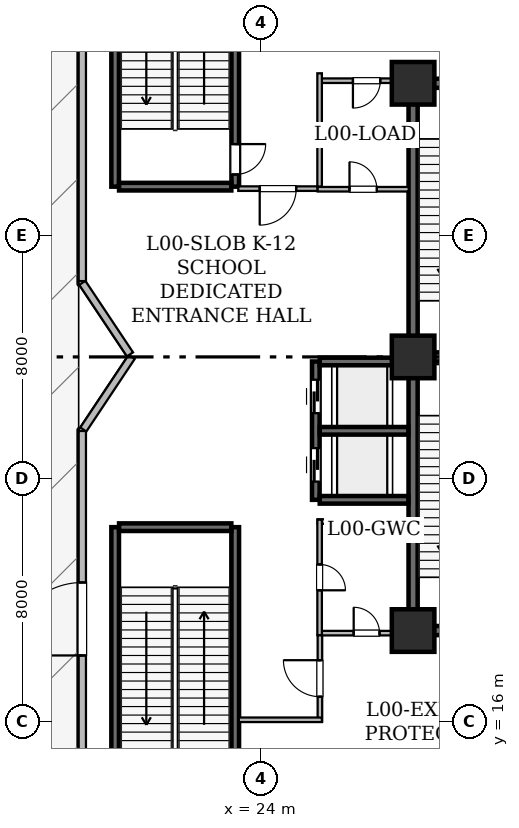
"""IFC4 building model, lengths in metres.
Left out: names, types, materials, properties, quantities, classifications, styles, units other than length and angle.
Written with IfcOpenShell. Run it as: python <this file> out.ifc"""

import sys

from ifc_helpers import new_model, si_unit, direction, frame, frame_2d, origin, origin_2d, place, context, subcontext, project, spatial, rectangle, hollow_rectangle, extrude, element, fill, save


model = new_model("IFC4")
c1 = context("Model", 3, precision=1e-05, world=origin(), true_north=direction((0.0, 1.0)))
c2 = subcontext(c1, "Body", "Model", "MODEL_VIEW")
j1 = project(units=[si_unit("LENGTHUNIT", "METRE"), si_unit("PLANEANGLEUNIT", "RADIAN")], contexts=[c1])
p1 = place(None, origin())
s1 = spatial("IfcSite", under=j1, at=p1, CompositionType="ELEMENT")
p2 = place(p1, origin())
s2 = spatial("IfcBuilding", under=s1, at=p2, CompositionType="ELEMENT")
p3 = place(p2, origin())
s3 = spatial("IfcBuildingStorey", under=s2, at=p3, CompositionType="ELEMENT", Elevation=0.0)
for number, where, z_axis, x_axis in (
    (1, (29.0, 19.0, 0.0), (0.0, 0.0, 1.0), (1.0, 0.0, 0.0)),
    (2, (29.0, 28.0, 0.0), (0.0, 0.0, 1.0), (1.0, 0.0, 0.0)),
    (3, (29.0, 37.0, 0.0), (0.0, 0.0, 1.0), (1.0, 0.0, 0.0)),
):
    element("IfcColumn", number, at=place(p3, frame(where, z_axis=z_axis, x_axis=x_axis)), inside=s3, PredefinedType="COLUMN", context=c2, shape_type="SweptSolid", body=[
        extrude(hollow_rectangle(XDim=1.4, YDim=1.4, WallThickness=0.07, at=origin_2d()), origin(), (0.0, 0.0, 1.0), 7.2),
    ])
p4 = place(p3, frame((18.12, 13.197, 0.0), z_axis=(0.0, 0.0, 1.0), x_axis=(0.0, 1.0, 0.0)))
e4 = element("IfcWall", 4, at=p4, inside=s3, PredefinedType="STANDARD", context=c2, shape_type="SweptSolid", body=[
    extrude(rectangle(XDim=12.367, YDim=0.24, at=frame_2d((6.184, 0.0))), origin(), (0.0, 0.0, 1.0), 6.78),
])
p5 = place(p4, frame((4.984, 0.0, 0.0)))
e5 = element("IfcOpeningElement", 5, at=p5, cuts=e4, PredefinedType="OPENING", context=c2, shape_type="SweptSolid", body=[
    extrude(rectangle(XDim=2.4, YDim=2.4, at=frame_2d((1.2, 1.2))), frame((0.0, 0.13, 0.0), z_axis=(0.0, -1.0, 0.0), x_axis=(1.0, 0.0, 0.0)), (0.0, 0.0, 1.0), 0.26),
])
p6 = place(p3, frame((18.152, 25.612, 0.0), z_axis=(0.0, 0.0, 1.0), x_axis=(0.55466093221, 0.83207646901, 0.0)))
e6 = element("IfcWall", 6, at=p6, inside=s3, PredefinedType="STANDARD", context=c2, shape_type="SweptSolid", body=[
    extrude(rectangle(XDim=2.87, YDim=0.24, at=frame_2d((1.435, 0.0))), origin(), (0.0, 0.0, 1.0), 6.78),
])
p7 = place(p3, frame((19.688, 28.084, 0.0), z_axis=(0.0, 0.0, 1.0), x_axis=(-0.554660333073, 0.832076868394, 0.0)))
e7 = element("IfcWall", 7, at=p7, inside=s3, PredefinedType="STANDARD", context=c2, shape_type="SweptSolid", body=[
    extrude(rectangle(XDim=2.827, YDim=0.24, at=frame_2d((1.413, 0.0))), origin(), (0.0, 0.0, 1.0), 6.78),
])
p8 = place(p3, frame((18.12, 30.494, 0.0), z_axis=(0.0, 0.0, 1.0), x_axis=(0.0, 1.0, 0.0)))
e8 = element("IfcWall", 8, at=p8, inside=s3, PredefinedType="STANDARD", context=c2, shape_type="SweptSolid", body=[
    extrude(rectangle(XDim=12.309, YDim=0.24, at=frame_2d((6.155, 0.0))), origin(), (0.0, 0.0, 1.0), 6.78),
])
for number, where, z_axis, x_axis in (
    (9, (29.0, 19.0, 0.0), (0.0, 0.0, 1.0), (0.0, 1.0, 0.0)),
    (10, (29.0, 28.0, 0.0), (0.0, 0.0, 1.0), (0.0, 1.0, 0.0)),
):
    element("IfcWall", number, at=place(p3, frame(where, z_axis=z_axis, x_axis=x_axis)), inside=s3, PredefinedType="SHEAR", context=c2, shape_type="SweptSolid", body=[
        extrude(rectangle(XDim=9.0, YDim=0.3, at=frame_2d((4.5, 0.0))), origin(), (0.0, 0.0, 1.0), 6.78),
    ])
p9 = place(p3, frame((39.4, 19.0, 0.0), z_axis=(0.0, 0.0, 1.0), x_axis=(-1.0, 0.0, 0.0)))
e11 = element("IfcWall", 11, at=p9, inside=s3, PredefinedType="SHEAR", context=c2, shape_type="SweptSolid", body=[
    extrude(rectangle(XDim=10.4, YDim=0.3, at=frame_2d((5.2, 0.0))), origin(), (0.0, 0.0, 1.0), 6.78),
])
p10 = place(p9, frame((4.3, 0.0, 0.0)))
e12 = element("IfcOpeningElement", 12, at=p10, cuts=e11, PredefinedType="OPENING", context=c2, shape_type="SweptSolid", body=[
    extrude(rectangle(XDim=1.2, YDim=2.15, at=frame_2d((0.6, 1.075))), frame((0.0, 0.16, 0.0), z_axis=(0.0, -1.0, 0.0), x_axis=(1.0, 0.0, 0.0)), (0.0, 0.0, 1.0), 0.32),
])
p11 = place(p3, frame((29.0, 37.0, 0.0), z_axis=(0.0, 0.0, 1.0), x_axis=(1.0, 0.0, 0.0)))
e13 = element("IfcWall", 13, at=p11, inside=s3, PredefinedType="SHEAR", context=c2, shape_type="SweptSolid", body=[
    extrude(rectangle(XDim=10.4, YDim=0.3, at=frame_2d((5.2, 0.0))), origin(), (0.0, 0.0, 1.0), 6.78),
])
p12 = place(p11, frame((5.14, 0.0, 0.0)))
e14 = element("IfcOpeningElement", 14, at=p12, cuts=e13, PredefinedType="OPENING", context=c2, shape_type="SweptSolid", body=[
    extrude(rectangle(XDim=1.15, YDim=2.2, at=frame_2d((0.575, 1.1))), frame((0.0, 0.16, 0.0), z_axis=(0.0, -1.0, 0.0), x_axis=(1.0, 0.0, 0.0)), (0.0, 0.0, 1.0), 0.32),
])
p13 = place(p3, frame((29.0, 28.0, 0.0), z_axis=(0.0, 0.0, 1.0), x_axis=(1.0, 0.0, 0.0)))
e15 = element("IfcWall", 15, at=p13, inside=s3, PredefinedType="SHEAR", context=c2, shape_type="SweptSolid", body=[
    extrude(rectangle(XDim=3.65, YDim=0.3, at=frame_2d((1.825, 0.0))), origin(), (0.0, 0.0, 1.0), 6.78),
])
p14 = place(p3, frame((19.2, 13.2, 0.0), z_axis=(0.0, 0.0, 1.0), x_axis=(0.0, 1.0, 0.0)))
e16 = element("IfcWall", 16, at=p14, inside=s3, PredefinedType="SHEAR", context=c2, shape_type="SweptSolid", body=[
    extrude(rectangle(XDim=9.2, YDim=0.25, at=frame_2d((4.6, 0.0))), origin(), (0.0, 0.0, 1.0), 6.78),
])
p15 = place(p3, frame((23.15, 22.4, 0.0), z_axis=(0.0, 0.0, 1.0), x_axis=(0.0, -1.0, 0.0)))
e17 = element("IfcWall", 17, at=p15, inside=s3, PredefinedType="SHEAR", context=c2, shape_type="SweptSolid", body=[
    extrude(rectangle(XDim=9.2, YDim=0.25, at=frame_2d((4.6, 0.0))), origin(), (0.0, 0.0, 1.0), 6.78),
])
p16 = place(p15, frame((7.4, 0.0, 0.0)))
e18 = element("IfcOpeningElement", 18, at=p16, cuts=e17, PredefinedType="OPENING", context=c2, shape_type="SweptSolid", body=[
    extrude(rectangle(XDim=1.0, YDim=2.15, at=frame_2d((0.5, 1.075))), frame((0.0, 0.135, 0.0), z_axis=(0.0, -1.0, 0.0), x_axis=(1.0, 0.0, 0.0)), (0.0, 0.0, 1.0), 0.27),
])
p17 = place(p3, frame((19.329, 22.4, 0.0), z_axis=(0.0, 0.0, 1.0), x_axis=(1.0, 0.0, 0.0)))
e19 = element("IfcWall", 19, at=p17, inside=s3, PredefinedType="SHEAR", context=c2, shape_type="SweptSolid", body=[
    extrude(rectangle(XDim=3.692, YDim=0.25, at=frame_2d((1.846, 0.0))), origin(), (0.0, 0.0, 1.0), 6.78),
])
p18 = place(p3, frame((19.2, 33.6, 0.0), z_axis=(0.0, 0.0, 1.0), x_axis=(0.0, 1.0, 0.0)))
e20 = element("IfcWall", 20, at=p18, inside=s3, PredefinedType="SHEAR", context=c2, shape_type="SweptSolid", body=[
    extrude(rectangle(XDim=9.2, YDim=0.25, at=frame_2d((4.6, 0.0))), origin(), (0.0, 0.0, 1.0), 6.78),
])
p19 = place(p3, frame((23.15, 42.8, 0.0), z_axis=(0.0, 0.0, 1.0), x_axis=(0.0, -1.0, 0.0)))
e21 = element("IfcWall", 21, at=p19, inside=s3, PredefinedType="SHEAR", context=c2, shape_type="SweptSolid", body=[
    extrude(rectangle(XDim=9.2, YDim=0.25, at=frame_2d((4.6, 0.0))), origin(), (0.0, 0.0, 1.0), 6.78),
])
p20 = place(p19, frame((7.8, 0.0, 0.0)))
e22 = element("IfcOpeningElement", 22, at=p20, cuts=e21, PredefinedType="OPENING", context=c2, shape_type="SweptSolid", body=[
    extrude(rectangle(XDim=1.0, YDim=2.15, at=frame_2d((0.5, 1.075))), frame((0.0, 0.135, 0.0), z_axis=(0.0, -1.0, 0.0), x_axis=(1.0, 0.0, 0.0)), (0.0, 0.0, 1.0), 0.27),
])
p21 = place(p3, frame((19.329, 33.6, 0.0), z_axis=(0.0, 0.0, 1.0), x_axis=(1.0, 0.0, 0.0)))
e23 = element("IfcWall", 23, at=p21, inside=s3, PredefinedType="SHEAR", context=c2, shape_type="SweptSolid", body=[
    extrude(rectangle(XDim=3.692, YDim=0.25, at=frame_2d((1.846, 0.0))), origin(), (0.0, 0.0, 1.0), 6.78),
])
p22 = place(p3, frame((25.8, 23.3, 0.0), z_axis=(0.0, 0.0, 1.0), x_axis=(0.0, 1.0, 0.0)))
e24 = element("IfcWall", 24, at=p22, inside=s3, PredefinedType="SHEAR", context=c2, shape_type="SweptSolid", body=[
    extrude(rectangle(XDim=4.55, YDim=0.25, at=frame_2d((2.275, 0.0))), origin(), (0.0, 0.0, 1.0), 6.78),
])
p23 = place(p22, frame((0.6, 0.0, 0.0)))
e25 = element("IfcOpeningElement", 25, at=p23, cuts=e24, PredefinedType="OPENING", context=c2, shape_type="SweptSolid", body=[
    extrude(rectangle(XDim=1.1, YDim=2.15, at=frame_2d((0.55, 1.075))), frame((0.0, 0.135, 0.0), z_axis=(0.0, -1.0, 0.0), x_axis=(1.0, 0.0, 0.0)), (0.0, 0.0, 1.0), 0.27),
])
p24 = place(p22, frame((2.85, 0.0, 0.0)))
e26 = element("IfcOpeningElement", 26, at=p24, cuts=e24, PredefinedType="OPENING", context=c2, shape_type="SweptSolid", body=[
    extrude(rectangle(XDim=1.1, YDim=2.15, at=frame_2d((0.55, 1.075))), frame((0.0, 0.135, 0.0), z_axis=(0.0, -1.0, 0.0), x_axis=(1.0, 0.0, 0.0)), (0.0, 0.0, 1.0), 0.27),
])
for number, where, z_axis, x_axis in (
    (27, (25.929, 23.3, 0.0), (0.0, 0.0, 1.0), (1.0, 0.0, 0.0)),
    (28, (25.929, 27.85, 0.0), (0.0, 0.0, 1.0), (1.0, 0.0, 0.0)),
    (29, (25.929, 25.57, 0.0), (0.0, 0.0, 1.0), (1.0, 0.0, 0.0)),
):
    element("IfcWall", number, at=place(p3, frame(where, z_axis=z_axis, x_axis=x_axis)), inside=s3, PredefinedType="SHEAR", context=c2, shape_type="SweptSolid", body=[
        extrude(rectangle(XDim=2.917, YDim=0.25, at=frame_2d((1.458, 0.0))), origin(), (0.0, 0.0, 1.0), 6.78),
    ])
p25 = place(p3, frame((25.935, 16.0, 0.0), z_axis=(0.0, 0.0, 1.0), x_axis=(0.0, 1.0, 0.0)))
e30 = element("IfcWall", 30, at=p25, inside=s3, PredefinedType="STANDARD", context=c2, shape_type="SweptSolid", body=[
    extrude(rectangle(XDim=2.85, YDim=0.15, at=frame_2d((1.425, 0.0))), origin(), (0.0, 0.0, 1.0), 6.78),
])
p26 = place(p25, frame((0.825, 0.0, 0.0)))
e31 = element("IfcOpeningElement", 31, at=p26, cuts=e30, PredefinedType="OPENING", context=c2, shape_type="SweptSolid", body=[
    extrude(rectangle(XDim=1.2, YDim=2.15, at=frame_2d((0.6, 1.075))), frame((0.0, 0.085, 0.0), z_axis=(0.0, -1.0, 0.0), x_axis=(1.0, 0.0, 0.0)), (0.0, 0.0, 1.0), 0.17),
])
p27 = place(p3, frame((23.267, 16.065, 0.0), z_axis=(0.0, 0.0, 1.0), x_axis=(1.0, 0.0, 0.0)))
e32 = element("IfcWall", 32, at=p27, inside=s3, PredefinedType="STANDARD", context=c2, shape_type="SweptSolid", body=[
    extrude(rectangle(XDim=2.733, YDim=0.15, at=frame_2d((1.366, 0.0))), origin(), (0.0, 0.0, 1.0), 6.78),
])
p28 = place(p3, frame((26.0, 18.915, 0.0), z_axis=(0.0, 0.0, 1.0), x_axis=(1.0, 0.0, 0.0)))
e33 = element("IfcWall", 33, at=p28, inside=s3, PredefinedType="STANDARD", context=c2, shape_type="SweptSolid", body=[
    extrude(rectangle(XDim=2.943, YDim=0.15, at=frame_2d((1.472, 0.0))), origin(), (0.0, 0.0, 1.0), 6.237),
])
p29 = place(p28, frame((1.046, 0.0, 0.0)))
e34 = element("IfcOpeningElement", 34, at=p29, cuts=e33, PredefinedType="OPENING", context=c2, shape_type="SweptSolid", body=[
    extrude(rectangle(XDim=0.85, YDim=2.1, at=frame_2d((0.425, 1.05))), frame((0.0, 0.085, 0.0), z_axis=(0.0, -1.0, 0.0), x_axis=(1.0, 0.0, 0.0)), (0.0, 0.0, 1.0), 0.17),
])
p30 = place(p3, frame((25.86, 33.535, 0.0), z_axis=(0.0, 0.0, 1.0), x_axis=(-1.0, 0.0, 0.0)))
e35 = element("IfcWall", 35, at=p30, inside=s3, PredefinedType="STANDARD", context=c2, shape_type="SweptSolid", body=[
    extrude(rectangle(XDim=2.61, YDim=0.15, at=frame_2d((1.305, 0.0))), origin(), (0.0, 0.0, 1.0), 6.78),
])
p31 = place(p30, frame((0.705, 0.0, 0.0)))
e36 = element("IfcOpeningElement", 36, at=p31, cuts=e35, PredefinedType="OPENING", context=c2, shape_type="SweptSolid", body=[
    extrude(rectangle(XDim=1.2, YDim=2.15, at=frame_2d((0.6, 1.075))), frame((0.0, 0.085, 0.0), z_axis=(0.0, -1.0, 0.0), x_axis=(1.0, 0.0, 0.0)), (0.0, 0.0, 1.0), 0.17),
])
p32 = place(p3, frame((28.943, 37.085, 0.0), z_axis=(0.0, 0.0, 1.0), x_axis=(-1.0, 0.0, 0.0)))
e37 = element("IfcWall", 37, at=p32, inside=s3, PredefinedType="STANDARD", context=c2, shape_type="SweptSolid", body=[
    extrude(rectangle(XDim=2.943, YDim=0.15, at=frame_2d((1.472, 0.0))), origin(), (0.0, 0.0, 1.0), 6.237),
])
p33 = place(p32, frame((1.022, 0.0, 0.0)))
e38 = element("IfcOpeningElement", 38, at=p33, cuts=e37, PredefinedType="OPENING", context=c2, shape_type="SweptSolid", body=[
    extrude(rectangle(XDim=0.9, YDim=2.1, at=frame_2d((0.45, 1.05))), frame((0.0, 0.085, 0.0), z_axis=(0.0, -1.0, 0.0), x_axis=(1.0, 0.0, 0.0)), (0.0, 0.0, 1.0), 0.17),
])
p34 = place(p3, frame((25.925, 37.329, 0.0), z_axis=(0.0, 0.0, 1.0), x_axis=(0.0, -1.0, 0.0)))
e39 = element("IfcWall", 39, at=p34, inside=s3, PredefinedType="STANDARD", context=c2, shape_type="SweptSolid", body=[
    extrude(rectangle(XDim=3.729, YDim=0.15, at=frame_2d((1.865, 0.0))), origin(), (0.0, 0.0, 1.0), 6.78),
])
p35 = place(p3, frame((28.856, 22.585, 0.0), z_axis=(0.0, 0.0, 1.0), x_axis=(-1.0, 0.0, 0.0)))
e40 = element("IfcWall", 40, at=p35, inside=s3, PredefinedType="STANDARD", context=c2, shape_type="SweptSolid", body=[
    extrude(rectangle(XDim=2.996, YDim=0.15, at=frame_2d((1.498, 0.0))), origin(), (0.0, 0.0, 1.0), 6.237),
])
p36 = place(p3, frame((25.925, 22.648, 0.0), z_axis=(0.0, 0.0, 1.0), x_axis=(0.0, -1.0, 0.0)))
e41 = element("IfcWall", 41, at=p36, inside=s3, PredefinedType="STANDARD", context=c2, shape_type="SweptSolid", body=[
    extrude(rectangle(XDim=3.798, YDim=0.15, at=frame_2d((1.899, 0.0))), origin(), (0.0, 0.0, 1.0), 6.78),
])
p37 = place(p36, frame((1.474, 0.0, 0.0)))
e42 = element("IfcOpeningElement", 42, at=p37, cuts=e41, PredefinedType="OPENING", context=c2, shape_type="SweptSolid", body=[
    extrude(rectangle(XDim=0.85, YDim=2.1, at=frame_2d((0.425, 1.05))), frame((0.0, 0.085, 0.0), z_axis=(0.0, -1.0, 0.0), x_axis=(1.0, 0.0, 0.0)), (0.0, 0.0, 1.0), 0.17),
])
p38 = place(p3, frame((25.86, 33.515, 0.0), z_axis=(0.0, 0.0, 1.0), x_axis=(1.0, 0.0, 0.0)))
e43 = element("IfcWall", 43, at=p38, inside=s3, PredefinedType="STANDARD", context=c2, shape_type="SweptSolid", body=[
    extrude(rectangle(XDim=2.996, YDim=0.15, at=frame_2d((1.498, 0.0))), origin(), (0.0, 0.0, 1.0), 6.237),
])
p39 = place(p38, frame((1.048, 0.0, 0.0)))
e44 = element("IfcOpeningElement", 44, at=p39, cuts=e43, PredefinedType="OPENING", context=c2, shape_type="SweptSolid", body=[
    extrude(rectangle(XDim=0.9, YDim=2.1, at=frame_2d((0.45, 1.05))), frame((0.0, 0.085, 0.0), z_axis=(0.0, -1.0, 0.0), x_axis=(1.0, 0.0, 0.0)), (0.0, 0.0, 1.0), 0.17),
])
p40 = place(p5, origin())
e45 = element("IfcDoor", 45, at=p40, inside=s3, OperationType="SINGLE_SWING_LEFT", PredefinedType="DOOR", context=c2, shape_type="SweptSolid", body=[
    extrude(rectangle(XDim=2.4, YDim=2.4, at=frame_2d((1.2, 1.2))), frame((0.0, 0.025, 0.0), z_axis=(0.0, -1.0, 0.0), x_axis=(1.0, 0.0, 0.0)), (0.0, 0.0, 1.0), 0.05),
])
fill(e5, e45)
p41 = place(p20, origin())
e46 = element("IfcDoor", 46, at=p41, inside=s3, OperationType="SINGLE_SWING_LEFT", PredefinedType="DOOR", context=c2, shape_type="SweptSolid", body=[
    extrude(rectangle(XDim=1.0, YDim=2.15, at=frame_2d((0.5, 1.075))), frame((0.0, 0.025, 0.0), z_axis=(0.0, -1.0, 0.0), x_axis=(1.0, 0.0, 0.0)), (0.0, 0.0, 1.0), 0.05),
])
fill(e22, e46)
p42 = place(p23, origin())
e47 = element("IfcDoor", 47, at=p42, inside=s3, OperationType="SLIDING_TO_LEFT", PredefinedType="DOOR", context=c2, shape_type="SweptSolid", body=[
    extrude(rectangle(XDim=1.1, YDim=2.15, at=frame_2d((0.55, 1.075))), frame((0.0, 0.025, 0.0), z_axis=(0.0, -1.0, 0.0), x_axis=(1.0, 0.0, 0.0)), (0.0, 0.0, 1.0), 0.05),
])
fill(e25, e47)
p43 = place(p24, origin())
e48 = element("IfcDoor", 48, at=p43, inside=s3, OperationType="SLIDING_TO_LEFT", PredefinedType="DOOR", context=c2, shape_type="SweptSolid", body=[
    extrude(rectangle(XDim=1.1, YDim=2.15, at=frame_2d((0.55, 1.075))), frame((0.0, 0.025, 0.0), z_axis=(0.0, -1.0, 0.0), x_axis=(1.0, 0.0, 0.0)), (0.0, 0.0, 1.0), 0.05),
])
fill(e26, e48)
p44 = place(p26, origin())
e49 = element("IfcDoor", 49, at=p44, inside=s3, OperationType="SINGLE_SWING_RIGHT", PredefinedType="DOOR", context=c2, shape_type="SweptSolid", body=[
    extrude(rectangle(XDim=1.2, YDim=2.15, at=frame_2d((0.6, 1.075))), frame((0.0, 0.025, 0.0), z_axis=(0.0, -1.0, 0.0), x_axis=(1.0, 0.0, 0.0)), (0.0, 0.0, 1.0), 0.05),
])
fill(e31, e49)
p45 = place(p29, origin())
e50 = element("IfcDoor", 50, at=p45, inside=s3, OperationType="SINGLE_SWING_LEFT", PredefinedType="DOOR", context=c2, shape_type="SweptSolid", body=[
    extrude(rectangle(XDim=0.85, YDim=2.1, at=frame_2d((0.425, 1.05))), frame((0.0, 0.025, 0.0), z_axis=(0.0, -1.0, 0.0), x_axis=(1.0, 0.0, 0.0)), (0.0, 0.0, 1.0), 0.05),
])
fill(e34, e50)
p46 = place(p31, origin())
e51 = element("IfcDoor", 51, at=p46, inside=s3, OperationType="SINGLE_SWING_RIGHT", PredefinedType="DOOR", context=c2, shape_type="SweptSolid", body=[
    extrude(rectangle(XDim=1.2, YDim=2.15, at=frame_2d((0.6, 1.075))), frame((0.0, 0.025, 0.0), z_axis=(0.0, -1.0, 0.0), x_axis=(1.0, 0.0, 0.0)), (0.0, 0.0, 1.0), 0.05),
])
fill(e36, e51)
p47 = place(p33, origin())
e52 = element("IfcDoor", 52, at=p47, inside=s3, OperationType="SINGLE_SWING_RIGHT", PredefinedType="DOOR", context=c2, shape_type="SweptSolid", body=[
    extrude(rectangle(XDim=0.9, YDim=2.1, at=frame_2d((0.45, 1.05))), frame((0.0, 0.025, 0.0), z_axis=(0.0, -1.0, 0.0), x_axis=(1.0, 0.0, 0.0)), (0.0, 0.0, 1.0), 0.05),
])
fill(e38, e52)
p48 = place(p37, origin())
e53 = element("IfcDoor", 53, at=p48, inside=s3, OperationType="SINGLE_SWING_RIGHT", PredefinedType="DOOR", context=c2, shape_type="SweptSolid", body=[
    extrude(rectangle(XDim=0.85, YDim=2.1, at=frame_2d((0.425, 1.05))), frame((0.0, 0.025, 0.0), z_axis=(0.0, -1.0, 0.0), x_axis=(1.0, 0.0, 0.0)), (0.0, 0.0, 1.0), 0.05),
])
fill(e42, e53)
p49 = place(p39, origin())
e54 = element("IfcDoor", 54, at=p49, inside=s3, OperationType="SINGLE_SWING_LEFT", PredefinedType="DOOR", context=c2, shape_type="SweptSolid", body=[
    extrude(rectangle(XDim=0.9, YDim=2.1, at=frame_2d((0.45, 1.05))), frame((0.0, 0.025, 0.0), z_axis=(0.0, -1.0, 0.0), x_axis=(1.0, 0.0, 0.0)), (0.0, 0.0, 1.0), 0.05),
])
fill(e44, e54)
save(model, sys.argv[1])
